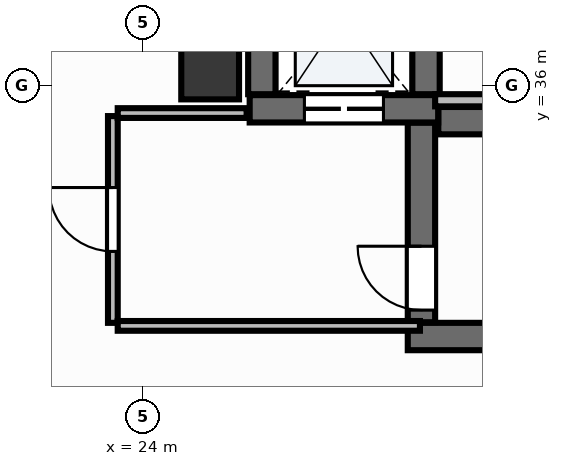
"""IFC4 building model, lengths in metres.
Left out: names, types, materials, properties, quantities, classifications, styles, units other than length and angle.
Written with IfcOpenShell. Run it as: python <this file> out.ifc"""

import sys

from ifc_helpers import new_model, si_unit, direction, frame, frame_2d, origin, origin_2d, place, context, subcontext, project, spatial, rectangle, extrude, element, fill, save


model = new_model("IFC4")
c1 = context("Model", 3, precision=1e-05, world=origin(), true_north=direction((0.0, 1.0)))
c2 = subcontext(c1, "Body", "Model", "MODEL_VIEW")
j1 = project(units=[si_unit("LENGTHUNIT", "METRE"), si_unit("PLANEANGLEUNIT", "RADIAN")], contexts=[c1])
p1 = place(None, origin())
s1 = spatial("IfcSite", under=j1, at=p1, CompositionType="ELEMENT")
p2 = place(p1, origin())
s2 = spatial("IfcBuilding", under=s1, at=p2, CompositionType="ELEMENT")
p3 = place(p2, frame((0.0, 0.0, -4.5)))
s3 = spatial("IfcBuildingStorey", under=s2, at=p3, CompositionType="ELEMENT", Elevation=-4.5)
p4 = place(p3, frame((28.852, 35.425, 0.0), z_axis=(0.0, 0.0, 1.0), x_axis=(1.0, 0.0, 0.0)))
e1 = element("IfcWall", 1, at=p4, inside=s3, PredefinedType="SHEAR", context=c2, shape_type="SweptSolid", body=[
    extrude(rectangle(XDim=8.248, YDim=0.45, at=frame_2d((4.124, 0.0))), origin(), (0.0, 0.0, 1.0), 4.18),
])
p5 = place(p3, frame((28.35, 31.875, 0.0), z_axis=(0.0, 0.0, 1.0), x_axis=(1.0, 0.0, 0.0)))
e2 = element("IfcWall", 2, at=p5, inside=s3, PredefinedType="SHEAR", context=c2, shape_type="SweptSolid", body=[
    extrude(rectangle(XDim=8.75, YDim=0.45, at=frame_2d((4.375, 0.0))), origin(), (0.0, 0.0, 1.0), 4.18),
])
p6 = place(p3, frame((28.575, 32.11, 0.0), z_axis=(0.0, 0.0, 1.0), x_axis=(0.0, 1.0, 0.0)))
e3 = element("IfcWall", 3, at=p6, inside=s3, PredefinedType="SHEAR", context=c2, shape_type="SweptSolid", body=[
    extrude(rectangle(XDim=3.283, YDim=0.45, at=frame_2d((1.642, 0.0))), origin(), (0.0, 0.0, 1.0), 4.18),
])
p7 = place(p6, frame((0.2, 0.0, 0.0)))
e4 = element("IfcOpeningElement", 4, at=p7, cuts=e3, PredefinedType="OPENING", context=c2, shape_type="SweptSolid", body=[
    extrude(rectangle(XDim=1.05, YDim=2.15, at=frame_2d((0.525, 1.075))), frame((0.0, 0.24, 0.0), z_axis=(0.0, -1.0, 0.0), x_axis=(1.0, 0.0, 0.0)), (0.0, 0.0, 1.0), 0.48),
])
p8 = place(p3, frame((25.75, 35.62, 0.0), z_axis=(0.0, 0.0, 1.0), x_axis=(1.0, 0.0, 0.0)))
e5 = element("IfcWall", 5, at=p8, inside=s3, PredefinedType="SHEAR", context=c2, shape_type="SweptSolid", body=[
    extrude(rectangle(XDim=3.1, YDim=0.45, at=frame_2d((1.55, 0.0))), origin(), (0.0, 0.0, 1.0), 4.18),
])
p9 = place(p8, frame((0.9, 0.0, 0.0)))
e6 = element("IfcOpeningElement", 6, at=p9, cuts=e5, PredefinedType="OPENING", context=c2, shape_type="SweptSolid", body=[
    extrude(rectangle(XDim=1.3, YDim=2.2, at=frame_2d((0.65, 1.1))), frame((0.0, 0.24, 0.0), z_axis=(0.0, -1.0, 0.0), x_axis=(1.0, 0.0, 0.0)), (0.0, 0.0, 1.0), 0.48),
])
for number, where, z_axis, x_axis in (
    (7, (25.95, 35.86, 0.0), (0.0, 0.0, 1.0), (0.0, 1.0, 0.0)),
    (8, (28.65, 35.86, 0.0), (0.0, 0.0, 1.0), (0.0, 1.0, 0.0)),
):
    element("IfcWall", number, at=place(p3, frame(where, z_axis=z_axis, x_axis=x_axis)), inside=s3, PredefinedType="SHEAR", context=c2, shape_type="SweptSolid", body=[
        extrude(rectangle(XDim=2.7, YDim=0.45, at=frame_2d((1.35, 0.0))), origin(), (0.0, 0.0, 1.0), 4.18),
    ])
p10 = place(p3, frame((25.1, 36.25, -0.0), z_axis=(0.0, 0.0, 1.0), x_axis=(1.0, 0.0, 0.0)))
e9 = element("IfcColumn", 9, at=p10, inside=s3, PredefinedType="PILASTER", context=c2, shape_type="SweptSolid", body=[
    extrude(rectangle(XDim=0.95, YDim=0.95, at=origin_2d()), origin(), (0.0, 0.0, 1.0), 4.181),
])
p11 = place(p3, frame((28.8, 35.76, 0.0), z_axis=(0.0, 0.0, 1.0), x_axis=(1.0, 0.0, 0.0)))
e10 = element("IfcWall", 10, at=p11, inside=s3, PredefinedType="PARTITIONING", context=c2, shape_type="SweptSolid", body=[
    extrude(rectangle(XDim=4.57, YDim=0.2, at=frame_2d((2.285, 0.0))), origin(), (0.0, 0.0, 1.0), 3.04),
])
p12 = place(p3, frame((23.5, 32.1, 0.0), z_axis=(0.0, 0.0, 1.0), x_axis=(0.0, 1.0, 0.0)))
e11 = element("IfcWall", 11, at=p12, inside=s3, PredefinedType="PARTITIONING", context=c2, shape_type="SweptSolid", body=[
    extrude(rectangle(XDim=3.4, YDim=0.16, at=frame_2d((1.7, 0.0))), origin(), (0.0, 0.0, 1.0), 3.04),
])
p13 = place(p12, frame((1.175, 0.0, 0.0)))
e12 = element("IfcOpeningElement", 12, at=p13, cuts=e11, PredefinedType="OPENING", context=c2, shape_type="SweptSolid", body=[
    extrude(rectangle(XDim=1.05, YDim=2.15, at=frame_2d((0.525, 1.075))), frame((0.0, 0.095, 0.0), z_axis=(0.0, -1.0, 0.0), x_axis=(1.0, 0.0, 0.0)), (0.0, 0.0, 1.0), 0.19),
])
p14 = place(p3, frame((23.58, 32.05, 0.0), z_axis=(0.0, 0.0, 1.0), x_axis=(1.0, 0.0, 0.0)))
e13 = element("IfcWall", 13, at=p14, inside=s3, PredefinedType="PARTITIONING", context=c2, shape_type="SweptSolid", body=[
    extrude(rectangle(XDim=4.97, YDim=0.16, at=frame_2d((2.485, 0.0))), origin(), (0.0, 0.0, 1.0), 3.04),
])
p15 = place(p3, frame((23.58, 35.55, 0.0), z_axis=(0.0, 0.0, 1.0), x_axis=(1.0, 0.0, 0.0)))
e14 = element("IfcWall", 14, at=p15, inside=s3, PredefinedType="PARTITIONING", context=c2, shape_type="SweptSolid", body=[
    extrude(rectangle(XDim=2.12, YDim=0.16, at=frame_2d((1.06, 0.0))), origin(), (0.0, 0.0, 1.0), 3.04),
])
p16 = place(p7, origin())
e15 = element("IfcDoor", 15, at=p16, inside=s3, OperationType="SINGLE_SWING_RIGHT", PredefinedType="DOOR", context=c2, shape_type="SweptSolid", body=[
    extrude(rectangle(XDim=1.05, YDim=2.15, at=frame_2d((0.525, 1.075))), frame((0.0, 0.025, 0.0), z_axis=(0.0, -1.0, 0.0), x_axis=(1.0, 0.0, 0.0)), (0.0, 0.0, 1.0), 0.05),
])
fill(e4, e15)
p17 = place(p9, origin())
e16 = element("IfcDoor", 16, at=p17, inside=s3, OperationType="DOUBLE_DOOR_SLIDING", PredefinedType="DOOR", context=c2, shape_type="SweptSolid", body=[
    extrude(rectangle(XDim=1.3, YDim=2.2, at=frame_2d((0.65, 1.1))), frame((0.0, 0.025, 0.0), z_axis=(0.0, -1.0, 0.0), x_axis=(1.0, 0.0, 0.0)), (0.0, 0.0, 1.0), 0.05),
])
fill(e6, e16)
p18 = place(p13, origin())
e17 = element("IfcDoor", 17, at=p18, inside=s3, OperationType="SINGLE_SWING_RIGHT", PredefinedType="DOOR", context=c2, shape_type="SweptSolid", body=[
    extrude(rectangle(XDim=1.05, YDim=2.15, at=frame_2d((0.525, 1.075))), frame((0.0, 0.025, 0.0), z_axis=(0.0, -1.0, 0.0), x_axis=(1.0, 0.0, 0.0)), (0.0, 0.0, 1.0), 0.05),
])
fill(e12, e17)
save(model, sys.argv[1])
